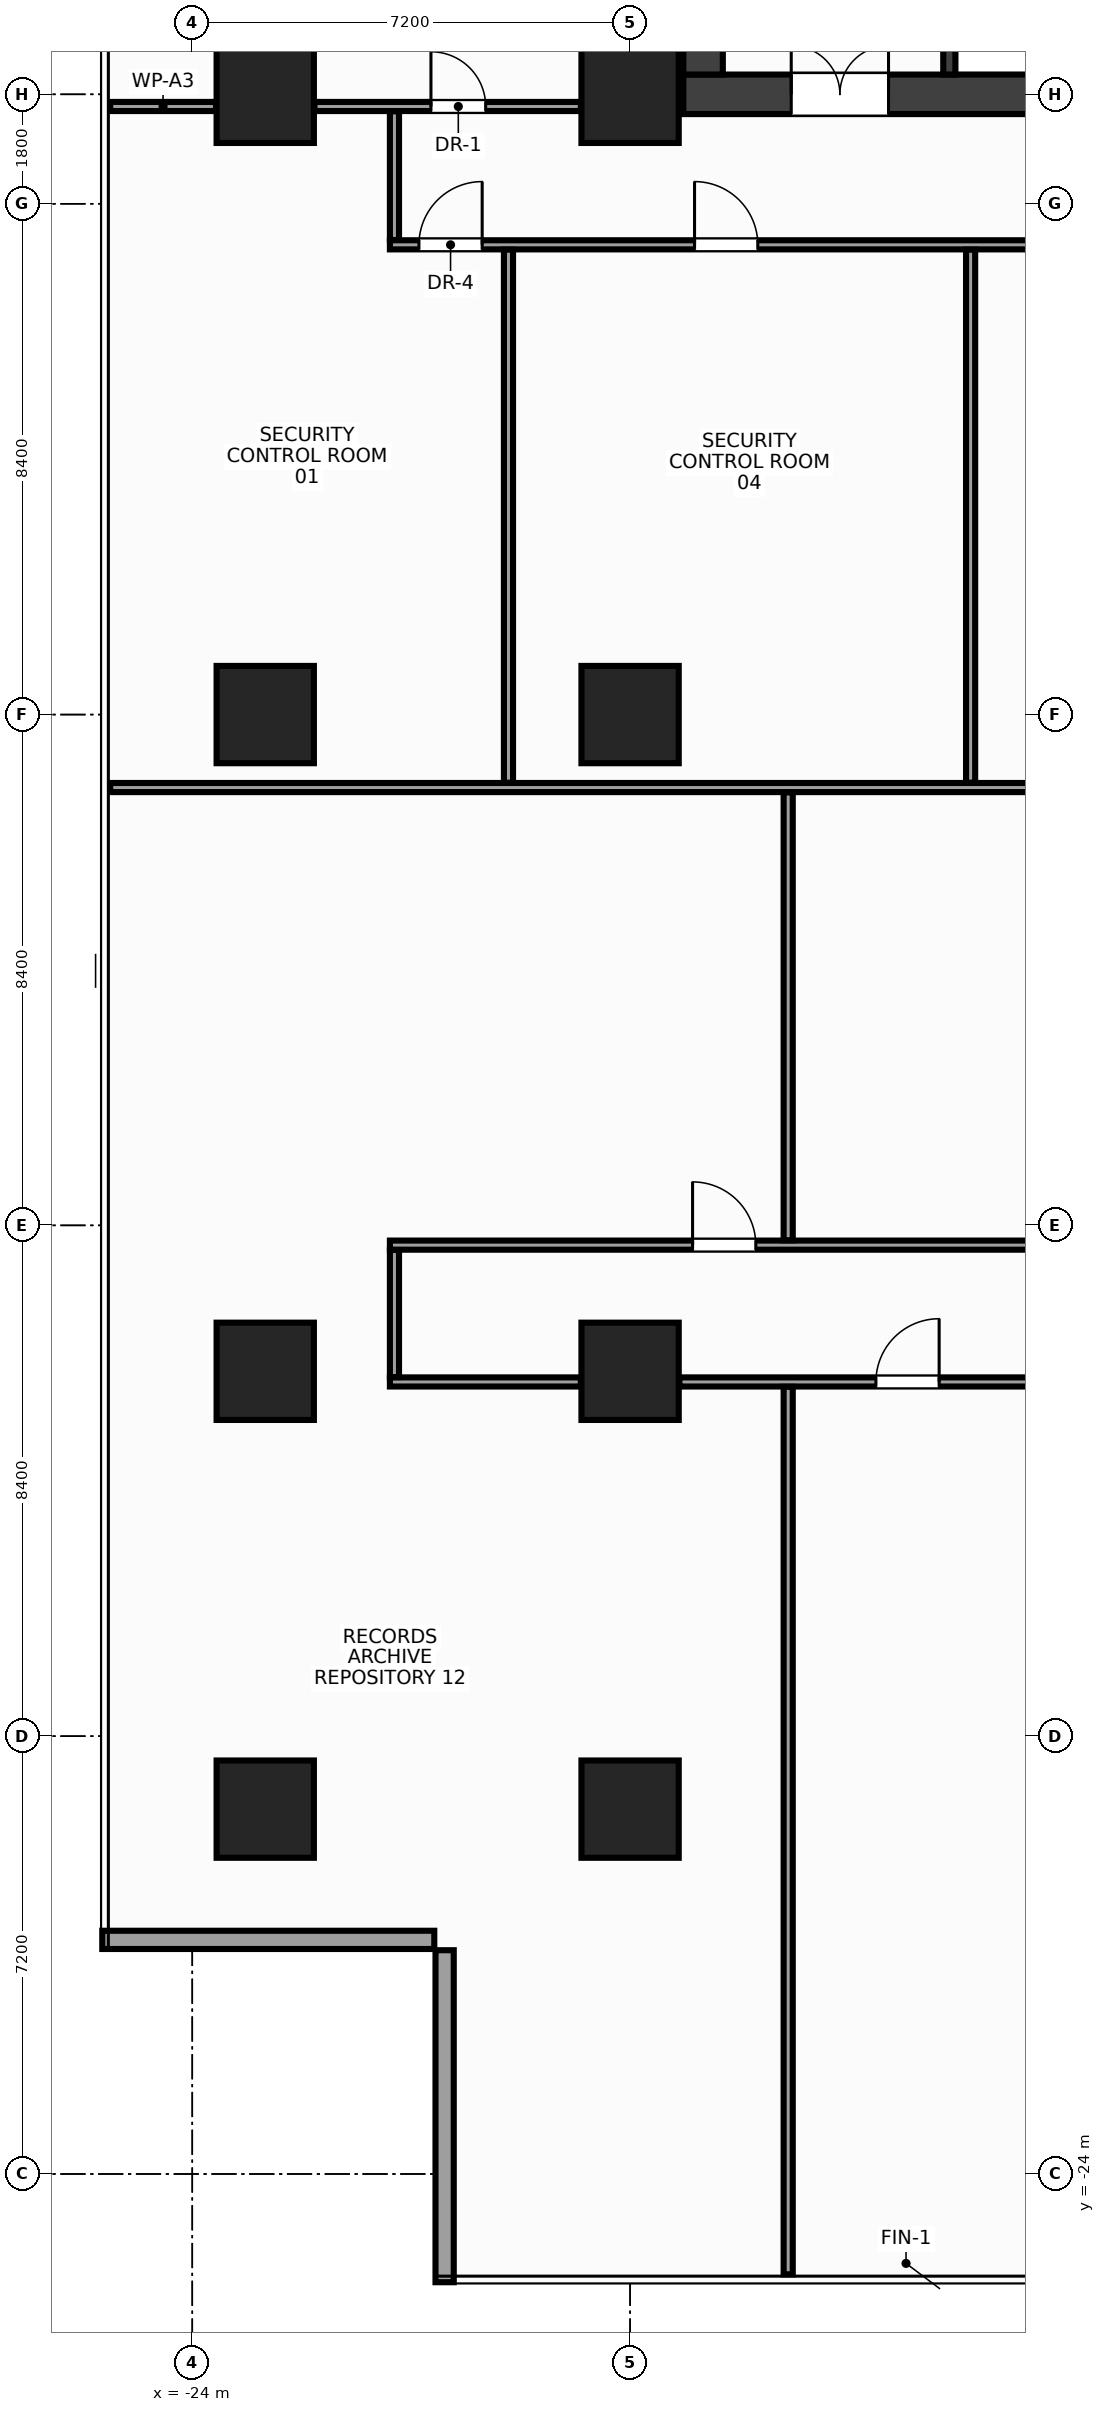
"""IFC4 building model, lengths in metres.
Left out: names, types, materials, properties, quantities, classifications, styles, units other than length and angle.
Written with IfcOpenShell. Run it as: python <this file> out.ifc"""

import sys

from ifc_helpers import new_model, si_unit, direction, frame, frame_2d, origin, origin_2d, place, context, subcontext, project, spatial, rectangle, extrude, source, transform, mapped, element, fill, save


model = new_model("IFC4")
c1 = context("Model", 3, precision=1e-05, world=origin(), true_north=direction((0.0, 1.0)))
c2 = subcontext(c1, "Body", "Model", "MODEL_VIEW")
j1 = project(units=[si_unit("LENGTHUNIT", "METRE"), si_unit("PLANEANGLEUNIT", "RADIAN")], contexts=[c1])
p1 = place(None, origin())
s1 = spatial("IfcSite", under=j1, at=p1, CompositionType="ELEMENT")
p2 = place(p1, origin())
s2 = spatial("IfcBuilding", under=s1, at=p2, CompositionType="ELEMENT")
p3 = place(p2, frame((0.0, 0.0, 99.2)))
s3 = spatial("IfcBuildingStorey", under=s2, at=p3, CompositionType="ELEMENT", Elevation=99.2)
m1 = source(origin(), c2, "Body", "SweptSolid", [
    extrude(rectangle(XDim=31.85, YDim=0.65, at=frame_2d((15.925, 0.0))), origin(), (0.0, 0.0, 1.0), 3.6),
])
p4 = place(p3, frame((-15.925, 10.2, 0.0), z_axis=(0.0, 0.0, 1.0), x_axis=(1.0, 0.0, 0.0)))
e1 = element("IfcWall", 1, at=p4, inside=s3, PredefinedType="SHEAR", context=c2, shape_type="MappedRepresentation", body=[
    mapped(m1, transform((0.0, 0.0, 0.0), x_axis=(1.0, 0.0, 0.0), y_axis=(0.0, 1.0, 0.0), z_axis=(0.0, 0.0, 1.0), scale=1.0)),
])
p5 = place(p4, frame((1.775, 0.0, 0.0)))
e2 = element("IfcOpeningElement", 2, at=p5, cuts=e1, PredefinedType="OPENING", context=c2, shape_type="SweptSolid", body=[
    extrude(rectangle(XDim=1.6, YDim=2.15, at=frame_2d((0.8, 1.075))), frame((0.0, 0.337, 0.0), z_axis=(0.0, -1.0, 0.0), x_axis=(1.0, 0.0, 0.0)), (0.0, 0.0, 1.0), 0.674),
])
p6 = place(p4, frame((28.475, 0.0, 0.0)))
e3 = element("IfcOpeningElement", 3, at=p6, cuts=e1, PredefinedType="OPENING", context=c2, shape_type="SweptSolid", body=[
    extrude(rectangle(XDim=1.6, YDim=2.15, at=frame_2d((0.8, 1.075))), frame((0.0, 0.337, 0.0), z_axis=(0.0, -1.0, 0.0), x_axis=(1.0, 0.0, 0.0)), (0.0, 0.0, 1.0), 0.674),
])
p7 = place(p4, frame((15.175, 0.0, 0.0)))
e4 = element("IfcOpeningElement", 4, at=p7, cuts=e1, PredefinedType="OPENING", context=c2, shape_type="SweptSolid", body=[
    extrude(rectangle(XDim=1.5, YDim=2.2, at=frame_2d((0.75, 1.1))), frame((0.0, 0.337, 0.0), z_axis=(0.0, -1.0, 0.0), x_axis=(1.0, 0.0, 0.0)), (0.0, 0.0, 1.0), 0.674),
])
m2 = source(origin(), c2, "Body", "SweptSolid", [
    extrude(rectangle(XDim=12.95, YDim=0.65, at=frame_2d((6.475, 0.0))), origin(), (0.0, 0.0, 1.0), 3.6),
])
p8 = place(p3, frame((-15.6, 10.525, 0.0), z_axis=(0.0, 0.0, 1.0), x_axis=(0.0, 1.0, 0.0)))
e5 = element("IfcWall", 5, at=p8, inside=s3, PredefinedType="SHEAR", context=c2, shape_type="MappedRepresentation", body=[
    mapped(m2, transform((0.0, 0.0, 0.0), x_axis=(1.0, 0.0, 0.0), y_axis=(0.0, 1.0, 0.0), z_axis=(0.0, 0.0, 1.0), scale=1.0)),
])
m3 = source(origin(), c2, "Body", "SweptSolid", [
    extrude(rectangle(XDim=3.125, YDim=0.2, at=frame_2d((1.562, 0.0))), origin(), (0.0, 0.0, 1.0), 3.6),
])
p9 = place(p3, frame((-11.55, 10.525, 0.0), z_axis=(0.0, 0.0, 1.0), x_axis=(0.0, 1.0, 0.0)))
e6 = element("IfcWall", 6, at=p9, inside=s3, PredefinedType="SHEAR", context=c2, shape_type="MappedRepresentation", body=[
    mapped(m3, transform((0.0, 0.0, 0.0), x_axis=(1.0, 0.0, 0.0), y_axis=(0.0, 1.0, 0.0), z_axis=(0.0, 0.0, 1.0), scale=1.0)),
])
p10 = place(p9, frame((0.9, 0.0, 0.0)))
e7 = element("IfcOpeningElement", 7, at=p10, cuts=e6, PredefinedType="OPENING", context=c2, shape_type="SweptSolid", body=[
    extrude(rectangle(XDim=1.1, YDim=2.15, at=frame_2d((0.55, 1.075))), frame((0.0, 0.112, 0.0), z_axis=(0.0, -1.0, 0.0), x_axis=(1.0, 0.0, 0.0)), (0.0, 0.0, 1.0), 0.224),
])
m4 = source(origin(), c2, "Body", "SweptSolid", [
    extrude(rectangle(XDim=1.6, YDim=1.6, at=origin_2d()), origin(), (0.0, 0.0, 1.0), 3.6),
])
for number, where, z_axis, x_axis in (
    (8, (-16.8, -18.0, 0.0), (0.0, 0.0, 1.0), (1.0, 0.0, 0.0)),
    (9, (-16.8, -10.8, 0.0), (0.0, 0.0, 1.0), (1.0, 0.0, 0.0)),
    (10, (-16.8, 0.0, 0.0), (0.0, 0.0, 1.0), (1.0, 0.0, 0.0)),
    (11, (-16.8, 10.2, 0.0), (0.0, 0.0, 1.0), (1.0, 0.0, 0.0)),
    (12, (-22.8, -18.0, 0.0), (0.0, 0.0, 1.0), (1.0, 0.0, 0.0)),
    (13, (-22.8, -10.8, 0.0), (0.0, 0.0, 1.0), (1.0, 0.0, 0.0)),
    (14, (-22.8, 0.0, 0.0), (0.0, 0.0, 1.0), (1.0, 0.0, 0.0)),
    (15, (-22.8, 10.2, 0.0), (0.0, 0.0, 1.0), (1.0, 0.0, 0.0)),
):
    element("IfcColumn", number, at=place(p3, frame(where, z_axis=z_axis, x_axis=x_axis)), inside=s3, PredefinedType="COLUMN", context=c2, shape_type="MappedRepresentation", body=[
        mapped(m4, transform((0.0, 0.0, 0.0), x_axis=(1.0, 0.0, 0.0), y_axis=(0.0, 1.0, 0.0), z_axis=(0.0, 0.0, 1.0), scale=1.0)),
    ])
m5 = source(origin(), c2, "Body", "SweptSolid", [
    extrude(rectangle(XDim=5.46, YDim=0.3, at=frame_2d((2.73, 0.0))), origin(), (0.0, 0.0, 1.0), 2.74),
])
for number, where, z_axis, x_axis in (
    (16, (-25.48, -20.15, 0.0), (0.0, 0.0, 1.0), (1.0, 0.0, 0.0)),
    (17, (-19.85, -20.32, 0.0), (0.0, 0.0, 1.0), (0.0, -1.0, 0.0)),
):
    element("IfcWall", number, at=place(p3, frame(where, z_axis=z_axis, x_axis=x_axis)), inside=s3, PredefinedType="STANDARD", context=c2, shape_type="MappedRepresentation", body=[
        mapped(m5, transform((0.0, 0.0, 0.0), x_axis=(1.0, 0.0, 0.0), y_axis=(0.0, 1.0, 0.0), z_axis=(0.0, 0.0, 1.0), scale=1.0)),
    ])
m6 = source(origin(), c2, "Body", "SweptSolid", [
    extrude(rectangle(XDim=1.74, YDim=0.15, at=frame_2d((0.87, 0.0))), origin(), (0.0, 0.0, 1.0), 3.36),
])
p11 = place(p3, frame((-25.35, 10.0, 0.0), z_axis=(0.0, 0.0, 1.0), x_axis=(1.0, 0.0, 0.0)))
e18 = element("IfcWall", 18, at=p11, inside=s3, PredefinedType="PARTITIONING", context=c2, shape_type="MappedRepresentation", body=[
    mapped(m6, transform((0.0, 0.0, 0.0), x_axis=(1.0, 0.0, 0.0), y_axis=(0.0, 1.0, 0.0), z_axis=(0.0, 0.0, 1.0), scale=1.0)),
])
m7 = source(origin(), c2, "Body", "SweptSolid", [
    extrude(rectangle(XDim=4.38, YDim=0.15, at=frame_2d((2.19, 0.0))), origin(), (0.0, 0.0, 1.0), 2.745),
])
p12 = place(p3, frame((-21.99, 10.0, 0.0), z_axis=(0.0, 0.0, 1.0), x_axis=(1.0, 0.0, 0.0)))
e19 = element("IfcWall", 19, at=p12, inside=s3, PredefinedType="PARTITIONING", context=c2, shape_type="MappedRepresentation", body=[
    mapped(m7, transform((0.0, 0.0, 0.0), x_axis=(1.0, 0.0, 0.0), y_axis=(0.0, 1.0, 0.0), z_axis=(0.0, 0.0, 1.0), scale=1.0)),
])
p13 = place(p12, frame((1.915, 0.0, 0.0)))
e20 = element("IfcOpeningElement", 20, at=p13, cuts=e19, PredefinedType="OPENING", context=c2, shape_type="SweptSolid", body=[
    extrude(rectangle(XDim=0.9, YDim=2.15, at=frame_2d((0.45, 1.075))), frame((0.0, 0.087, 0.0), z_axis=(0.0, -1.0, 0.0), x_axis=(1.0, 0.0, 0.0)), (0.0, 0.0, 1.0), 0.174),
])
m8 = source(origin(), c2, "Body", "SweptSolid", [
    extrude(rectangle(XDim=16.8, YDim=0.15, at=frame_2d((8.4, 0.0))), origin(), (0.0, 0.0, 1.0), 2.745),
])
p14 = place(p3, frame((-20.75, 7.725, 0.0), z_axis=(0.0, 0.0, 1.0), x_axis=(1.0, 0.0, 0.0)))
e21 = element("IfcWall", 21, at=p14, inside=s3, PredefinedType="PARTITIONING", context=c2, shape_type="MappedRepresentation", body=[
    mapped(m8, transform((0.0, 0.0, 0.0), x_axis=(1.0, 0.0, 0.0), y_axis=(0.0, 1.0, 0.0), z_axis=(0.0, 0.0, 1.0), scale=1.0)),
])
p15 = place(p14, frame((0.478, 0.0, 0.0)))
e22 = element("IfcOpeningElement", 22, at=p15, cuts=e21, PredefinedType="OPENING", context=c2, shape_type="SweptSolid", body=[
    extrude(rectangle(XDim=1.04, YDim=2.2, at=frame_2d((0.52, 1.1))), frame((0.0, 0.087, 0.0), z_axis=(0.0, -1.0, 0.0), x_axis=(1.0, 0.0, 0.0)), (0.0, 0.0, 1.0), 0.174),
])
p16 = place(p14, frame((5.01, 0.0, 0.0)))
e23 = element("IfcOpeningElement", 23, at=p16, cuts=e21, PredefinedType="OPENING", context=c2, shape_type="SweptSolid", body=[
    extrude(rectangle(XDim=1.04, YDim=2.2, at=frame_2d((0.52, 1.1))), frame((0.0, 0.087, 0.0), z_axis=(0.0, -1.0, 0.0), x_axis=(1.0, 0.0, 0.0)), (0.0, 0.0, 1.0), 0.174),
])
p17 = place(p14, frame((12.53, 0.0, 0.0)))
e24 = element("IfcOpeningElement", 24, at=p17, cuts=e21, PredefinedType="OPENING", context=c2, shape_type="SweptSolid", body=[
    extrude(rectangle(XDim=1.04, YDim=2.2, at=frame_2d((0.52, 1.1))), frame((0.0, 0.087, 0.0), z_axis=(0.0, -1.0, 0.0), x_axis=(1.0, 0.0, 0.0)), (0.0, 0.0, 1.0), 0.174),
])
p18 = place(p3, frame((-20.75, -8.725, 0.0), z_axis=(0.0, 0.0, 1.0), x_axis=(1.0, 0.0, 0.0)))
e25 = element("IfcWall", 25, at=p18, inside=s3, PredefinedType="PARTITIONING", context=c2, shape_type="MappedRepresentation", body=[
    mapped(m8, transform((0.0, 0.0, 0.0), x_axis=(1.0, 0.0, 0.0), y_axis=(0.0, 1.0, 0.0), z_axis=(0.0, 0.0, 1.0), scale=1.0)),
])
p19 = place(p18, frame((11.133, 0.0, 0.0)))
e26 = element("IfcOpeningElement", 26, at=p19, cuts=e25, PredefinedType="OPENING", context=c2, shape_type="SweptSolid", body=[
    extrude(rectangle(XDim=1.04, YDim=2.2, at=frame_2d((0.52, 1.1))), frame((0.0, 0.087, 0.0), z_axis=(0.0, -1.0, 0.0), x_axis=(1.0, 0.0, 0.0)), (0.0, 0.0, 1.0), 0.174),
])
p20 = place(p18, frame((4.978, 0.0, 0.0)))
e27 = element("IfcOpeningElement", 27, at=p20, cuts=e25, PredefinedType="OPENING", context=c2, shape_type="SweptSolid", body=[
    extrude(rectangle(XDim=1.04, YDim=2.2, at=frame_2d((0.52, 1.1))), frame((0.0, 0.087, 0.0), z_axis=(0.0, -1.0, 0.0), x_axis=(1.0, 0.0, 0.0)), (0.0, 0.0, 1.0), 0.174),
])
m9 = source(origin(), c2, "Body", "SweptSolid", [
    extrude(rectangle(XDim=3.14, YDim=0.15, at=frame_2d((1.57, 0.0))), origin(), (0.0, 0.0, 1.0), 2.745),
])
p21 = place(p3, frame((-20.75, -10.975, 0.0), z_axis=(0.0, 0.0, 1.0), x_axis=(1.0, 0.0, 0.0)))
e28 = element("IfcWall", 28, at=p21, inside=s3, PredefinedType="PARTITIONING", context=c2, shape_type="MappedRepresentation", body=[
    mapped(m9, transform((0.0, 0.0, 0.0), x_axis=(1.0, 0.0, 0.0), y_axis=(0.0, 1.0, 0.0), z_axis=(0.0, 0.0, 1.0), scale=1.0)),
])
m10 = source(origin(), c2, "Body", "SweptSolid", [
    extrude(rectangle(XDim=7.08, YDim=0.15, at=frame_2d((3.54, 0.0))), origin(), (0.0, 0.0, 1.0), 2.745),
])
p22 = place(p3, frame((-15.99, -10.975, 0.0), z_axis=(0.0, 0.0, 1.0), x_axis=(1.0, 0.0, 0.0)))
e29 = element("IfcWall", 29, at=p22, inside=s3, PredefinedType="PARTITIONING", context=c2, shape_type="MappedRepresentation", body=[
    mapped(m10, transform((0.0, 0.0, 0.0), x_axis=(1.0, 0.0, 0.0), y_axis=(0.0, 1.0, 0.0), z_axis=(0.0, 0.0, 1.0), scale=1.0)),
])
p23 = place(p22, frame((3.232, 0.0, 0.0)))
e30 = element("IfcOpeningElement", 30, at=p23, cuts=e29, PredefinedType="OPENING", context=c2, shape_type="SweptSolid", body=[
    extrude(rectangle(XDim=1.04, YDim=2.2, at=frame_2d((0.52, 1.1))), frame((0.0, 0.087, 0.0), z_axis=(0.0, -1.0, 0.0), x_axis=(1.0, 0.0, 0.0)), (0.0, 0.0, 1.0), 0.174),
])
m11 = source(origin(), c2, "Body", "SweptSolid", [
    extrude(rectangle(XDim=2.115, YDim=0.15, at=frame_2d((1.058, 0.0))), origin(), (0.0, 0.0, 1.0), 3.36),
])
p24 = place(p3, frame((-20.675, 7.805, 0.0), z_axis=(0.0, 0.0, 1.0), x_axis=(0.0, 1.0, 0.0)))
e31 = element("IfcWall", 31, at=p24, inside=s3, PredefinedType="PARTITIONING", context=c2, shape_type="MappedRepresentation", body=[
    mapped(m11, transform((0.0, 0.0, 0.0), x_axis=(1.0, 0.0, 0.0), y_axis=(0.0, 1.0, 0.0), z_axis=(0.0, 0.0, 1.0), scale=1.0)),
])
m12 = source(origin(), c2, "Body", "SweptSolid", [
    extrude(rectangle(XDim=2.09, YDim=0.15, at=frame_2d((1.045, 0.0))), origin(), (0.0, 0.0, 1.0), 3.36),
])
p25 = place(p3, frame((-20.675, -10.895, 0.0), z_axis=(0.0, 0.0, 1.0), x_axis=(0.0, 1.0, 0.0)))
e32 = element("IfcWall", 32, at=p25, inside=s3, PredefinedType="PARTITIONING", context=c2, shape_type="MappedRepresentation", body=[
    mapped(m12, transform((0.0, 0.0, 0.0), x_axis=(1.0, 0.0, 0.0), y_axis=(0.0, 1.0, 0.0), z_axis=(0.0, 0.0, 1.0), scale=1.0)),
])
m13 = source(origin(), c2, "Body", "SweptSolid", [
    extrude(rectangle(XDim=21.395, YDim=0.15, at=frame_2d((10.698, 0.0))), origin(), (0.0, 0.0, 1.0), 2.745),
])
p26 = place(p3, frame((-25.35, -1.2, 0.0), z_axis=(0.0, 0.0, 1.0), x_axis=(1.0, 0.0, 0.0)))
e33 = element("IfcWall", 33, at=p26, inside=s3, PredefinedType="PARTITIONING", context=c2, shape_type="MappedRepresentation", body=[
    mapped(m13, transform((0.0, 0.0, 0.0), x_axis=(1.0, 0.0, 0.0), y_axis=(0.0, 1.0, 0.0), z_axis=(0.0, 0.0, 1.0), scale=1.0)),
])
m14 = source(origin(), c2, "Body", "SweptSolid", [
    extrude(rectangle(XDim=8.765, YDim=0.15, at=frame_2d((4.383, 0.0))), origin(), (0.0, 0.0, 1.0), 2.745),
])
p27 = place(p3, frame((-18.8, -1.12, 0.0), z_axis=(0.0, 0.0, 1.0), x_axis=(0.0, 1.0, 0.0)))
e34 = element("IfcWall", 34, at=p27, inside=s3, PredefinedType="PARTITIONING", context=c2, shape_type="MappedRepresentation", body=[
    mapped(m14, transform((0.0, 0.0, 0.0), x_axis=(1.0, 0.0, 0.0), y_axis=(0.0, 1.0, 0.0), z_axis=(0.0, 0.0, 1.0), scale=1.0)),
])
m15 = source(origin(), c2, "Body", "SweptSolid", [
    extrude(rectangle(XDim=8.765, YDim=0.15, at=frame_2d((4.383, 0.0))), origin(), (0.0, 0.0, 1.0), 2.645),
])
p28 = place(p3, frame((-11.2, -1.12, 0.0), z_axis=(0.0, 0.0, 1.0), x_axis=(0.0, 1.0, 0.0)))
e35 = element("IfcWall", 35, at=p28, inside=s3, PredefinedType="PARTITIONING", context=c2, shape_type="MappedRepresentation", body=[
    mapped(m15, transform((0.0, 0.0, 0.0), x_axis=(1.0, 0.0, 0.0), y_axis=(0.0, 1.0, 0.0), z_axis=(0.0, 0.0, 1.0), scale=1.0)),
])
m16 = source(origin(), c2, "Body", "SweptSolid", [
    extrude(rectangle(XDim=14.595, YDim=0.15, at=frame_2d((7.297, 0.0))), origin(), (0.0, 0.0, 1.0), 2.745),
])
p29 = place(p3, frame((-14.2, -25.65, 0.0), z_axis=(0.0, 0.0, 1.0), x_axis=(0.0, 1.0, 0.0)))
e36 = element("IfcWall", 36, at=p29, inside=s3, PredefinedType="PARTITIONING", context=c2, shape_type="MappedRepresentation", body=[
    mapped(m16, transform((0.0, 0.0, 0.0), x_axis=(1.0, 0.0, 0.0), y_axis=(0.0, 1.0, 0.0), z_axis=(0.0, 0.0, 1.0), scale=1.0)),
])
m17 = source(origin(), c2, "Body", "SweptSolid", [
    extrude(rectangle(XDim=7.365, YDim=0.15, at=frame_2d((3.683, 0.0))), origin(), (0.0, 0.0, 1.0), 3.36),
])
p30 = place(p3, frame((-14.2, -8.645, 0.0), z_axis=(0.0, 0.0, 1.0), x_axis=(0.0, 1.0, 0.0)))
e37 = element("IfcWall", 37, at=p30, inside=s3, PredefinedType="PARTITIONING", context=c2, shape_type="MappedRepresentation", body=[
    mapped(m17, transform((0.0, 0.0, 0.0), x_axis=(1.0, 0.0, 0.0), y_axis=(0.0, 1.0, 0.0), z_axis=(0.0, 0.0, 1.0), scale=1.0)),
])
m18 = source(origin(), c2, "Body", "SweptSolid", [
    extrude(rectangle(XDim=1.6, YDim=2.15, at=frame_2d((0.8, 1.075))), frame((0.0, 0.025, 0.0), z_axis=(0.0, -1.0, 0.0), x_axis=(1.0, 0.0, 0.0)), (0.0, 0.0, 1.0), 0.05),
])
p31 = place(p5, origin())
e38 = element("IfcDoor", 38, at=p31, inside=s3, OperationType="DOUBLE_DOOR_SINGLE_SWING", PredefinedType="DOOR", context=c2, shape_type="MappedRepresentation", body=[
    mapped(m18, transform((0.0, 0.0, 0.0), x_axis=(1.0, 0.0, 0.0), y_axis=(0.0, 1.0, 0.0), z_axis=(0.0, 0.0, 1.0), scale=1.0)),
])
fill(e2, e38)
m19 = source(origin(), c2, "Body", "SweptSolid", [
    extrude(rectangle(XDim=0.9, YDim=2.15, at=frame_2d((0.45, 1.075))), frame((0.0, 0.025, 0.0), z_axis=(0.0, -1.0, 0.0), x_axis=(1.0, 0.0, 0.0)), (0.0, 0.0, 1.0), 0.05),
])
p32 = place(p13, origin())
e39 = element("IfcDoor", 39, at=p32, inside=s3, OperationType="SINGLE_SWING_LEFT", PredefinedType="DOOR", context=c2, shape_type="MappedRepresentation", body=[
    mapped(m19, transform((0.0, 0.0, 0.0), x_axis=(1.0, 0.0, 0.0), y_axis=(0.0, 1.0, 0.0), z_axis=(0.0, 0.0, 1.0), scale=1.0)),
])
fill(e20, e39)
m20 = source(origin(), c2, "Body", "SweptSolid", [
    extrude(rectangle(XDim=1.04, YDim=2.2, at=frame_2d((0.52, 1.1))), frame((0.0, 0.025, 0.0), z_axis=(0.0, -1.0, 0.0), x_axis=(1.0, 0.0, 0.0)), (0.0, 0.0, 1.0), 0.05),
])
p33 = place(p15, origin())
e40 = element("IfcDoor", 40, at=p33, inside=s3, OperationType="SINGLE_SWING_RIGHT", PredefinedType="DOOR", context=c2, shape_type="MappedRepresentation", body=[
    mapped(m20, transform((0.0, 0.0, 0.0), x_axis=(1.0, 0.0, 0.0), y_axis=(0.0, 1.0, 0.0), z_axis=(0.0, 0.0, 1.0), scale=1.0)),
])
fill(e22, e40)
p34 = place(p16, origin())
e41 = element("IfcDoor", 41, at=p34, inside=s3, OperationType="SINGLE_SWING_LEFT", PredefinedType="DOOR", context=c2, shape_type="MappedRepresentation", body=[
    mapped(m20, transform((0.0, 0.0, 0.0), x_axis=(1.0, 0.0, 0.0), y_axis=(0.0, 1.0, 0.0), z_axis=(0.0, 0.0, 1.0), scale=1.0)),
])
fill(e23, e41)
p35 = place(p20, origin())
e42 = element("IfcDoor", 42, at=p35, inside=s3, OperationType="SINGLE_SWING_LEFT", PredefinedType="DOOR", context=c2, shape_type="MappedRepresentation", body=[
    mapped(m20, transform((0.0, 0.0, 0.0), x_axis=(1.0, 0.0, 0.0), y_axis=(0.0, 1.0, 0.0), z_axis=(0.0, 0.0, 1.0), scale=1.0)),
])
fill(e27, e42)
p36 = place(p23, origin())
e43 = element("IfcDoor", 43, at=p36, inside=s3, OperationType="SINGLE_SWING_RIGHT", PredefinedType="DOOR", context=c2, shape_type="MappedRepresentation", body=[
    mapped(m20, transform((0.0, 0.0, 0.0), x_axis=(1.0, 0.0, 0.0), y_axis=(0.0, 1.0, 0.0), z_axis=(0.0, 0.0, 1.0), scale=1.0)),
])
fill(e30, e43)
save(model, sys.argv[1])
